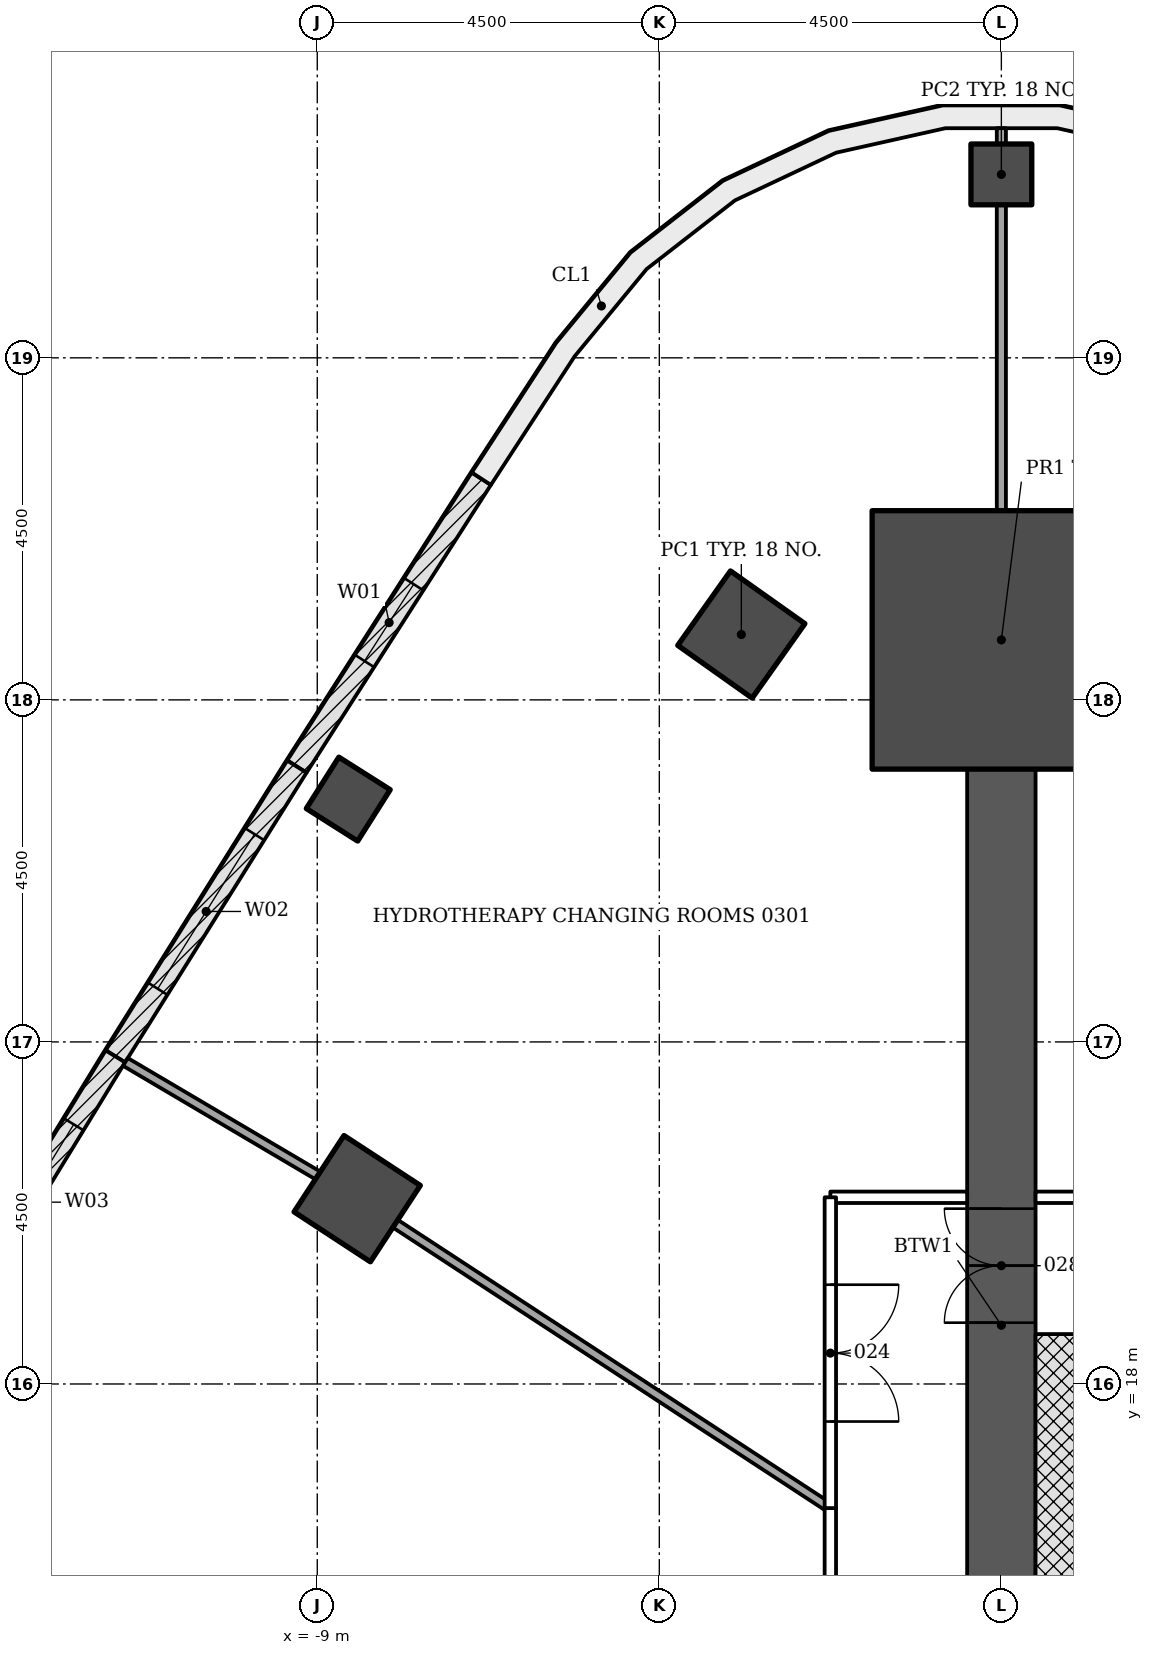
"""IFC4 building model, lengths in metres.
Left out: names, types, materials, properties, quantities, classifications, styles, units other than length and angle.
Written with IfcOpenShell. Run it as: python <this file> out.ifc"""

import sys

from ifc_helpers import new_model, si_unit, direction, frame, frame_2d, origin, origin_2d, place, context, subcontext, project, spatial, polyline, rectangle, outline, extrude, element, fill, save


model = new_model("IFC4")
c1 = context("Model", 3, precision=1e-05, world=origin(), true_north=direction((0.0, 1.0)))
c2 = subcontext(c1, "Body", "Model", "MODEL_VIEW")
j1 = project(units=[si_unit("LENGTHUNIT", "METRE"), si_unit("PLANEANGLEUNIT", "RADIAN")], contexts=[c1])
p1 = place(None, origin())
s1 = spatial("IfcSite", under=j1, at=p1, CompositionType="ELEMENT")
p2 = place(p1, origin())
s2 = spatial("IfcBuilding", under=s1, at=p2, CompositionType="ELEMENT")
p3 = place(p2, frame((0.0, 0.0, 15.0)))
s3 = spatial("IfcBuildingStorey", under=s2, at=p3, CompositionType="ELEMENT", Elevation=15.0)
for number, where, z_axis, x_axis in (
    (1, (-3.421, 27.86, -0.25), (0.0, 0.0, 1.0), (-0.816, 0.578, 0.0)),
    (2, (-8.475, 20.438, -0.25), (0.0, 0.0, 1.0), (-0.837, 0.547, 0.0)),
):
    element("IfcColumn", number, at=place(p3, frame(where, z_axis=z_axis, x_axis=x_axis)), inside=s3, PredefinedType="COLUMN", context=c2, shape_type="SweptSolid", body=[
        extrude(rectangle(XDim=1.2, YDim=1.2, at=origin_2d()), origin(), (0.0, 0.0, 1.0), 4.5),
    ])
for number, where, z_axis, x_axis in (
    (3, (0.0, 33.913, -0.25), (0.0, 0.0, 1.0), (0.0, 1.0, 0.0)),
    (4, (-8.592, 25.695, -0.25), (0.0, 0.0, 1.0), (-0.845, 0.535, 0.0)),
):
    element("IfcColumn", number, at=place(p3, frame(where, z_axis=z_axis, x_axis=x_axis)), inside=s3, PredefinedType="COLUMN", context=c2, shape_type="SweptSolid", body=[
        extrude(rectangle(XDim=0.8, YDim=0.8, at=origin_2d()), origin(), (0.0, 0.0, 1.0), 4.5),
    ])
p4 = place(p3, frame((0.0, 11.456, -0.25), z_axis=(0.0, 0.0, 1.0), x_axis=(0.0, 1.0, 0.0)))
e5 = element("IfcWall", 5, at=p4, inside=s3, PredefinedType="SHEAR", context=c2, shape_type="SweptSolid", body=[
    extrude(rectangle(XDim=14.633, YDim=0.9, at=frame_2d((7.316, 0.0))), origin(), (0.0, 0.0, 1.0), 4.5),
])
p5 = place(p4, frame((7.35, 0.0, 0.25)))
e6 = element("IfcOpeningElement", 6, at=p5, cuts=e5, PredefinedType="OPENING", context=c2, shape_type="SweptSolid", body=[
    extrude(rectangle(XDim=1.5, YDim=2.1, at=frame_2d((0.75, 1.05))), frame((0.0, 0.46, 0.0), z_axis=(0.0, -1.0, 0.0), x_axis=(1.0, 0.0, 0.0)), (0.0, 0.0, 1.0), 0.92),
])
p6 = place(p3, frame((0.0, 27.789, -0.25), z_axis=(0.0, 0.0, 1.0), x_axis=(0.0, 1.0, 0.0)))
e7 = element("IfcColumn", 7, at=p6, inside=s3, PredefinedType="COLUMN", context=c2, shape_type="SweptSolid", body=[
    extrude(rectangle(XDim=3.4, YDim=3.4, at=origin_2d()), origin(), (0.0, 0.0, 1.0), 4.5),
])
p7 = place(p3, frame((-9.268, 26.124, 0.0), z_axis=(0.0, 0.0, 1.0), x_axis=(0.539483537275, 0.841996147859, 0.0)))
e8 = element("IfcWall", 8, at=p7, inside=s3, PredefinedType="NOTDEFINED", context=c2, shape_type="SweptSolid", body=[
    extrude(rectangle(XDim=4.496, YDim=0.3, at=frame_2d((2.248, 0.0))), origin(), (0.0, 0.0, 1.0), 4.25),
])
p8 = place(p7, frame((1.648, 0.0, 0.8)))
e9 = element("IfcOpeningElement", 9, at=p8, cuts=e8, PredefinedType="OPENING", context=c2, shape_type="SweptSolid", body=[
    extrude(rectangle(XDim=1.2, YDim=3.0, at=frame_2d((0.6, 1.5))), frame((0.0, 0.16, 0.0), z_axis=(0.0, -1.0, 0.0), x_axis=(1.0, 0.0, 0.0)), (0.0, 0.0, 1.0), 0.32),
])
p9 = place(p3, frame((-11.655, 22.311, 0.0), z_axis=(0.0, 0.0, 1.0), x_axis=(0.530804082031, 0.847494558389, 0.0)))
e10 = element("IfcWall", 10, at=p9, inside=s3, PredefinedType="NOTDEFINED", context=c2, shape_type="SweptSolid", body=[
    extrude(rectangle(XDim=4.496, YDim=0.3, at=frame_2d((2.248, 0.0))), origin(), (0.0, 0.0, 1.0), 4.25),
])
p10 = place(p9, frame((1.048, 0.0, 0.9)))
e11 = element("IfcOpeningElement", 11, at=p10, cuts=e10, PredefinedType="OPENING", context=c2, shape_type="SweptSolid", body=[
    extrude(rectangle(XDim=2.4, YDim=2.4, at=frame_2d((1.2, 1.2))), frame((0.0, 0.16, 0.0), z_axis=(0.0, -1.0, 0.0), x_axis=(1.0, 0.0, 0.0)), (0.0, 0.0, 1.0), 0.32),
])
p11 = place(p3, frame((-14.004, 18.475, 0.0), z_axis=(0.0, 0.0, 1.0), x_axis=(0.522078085402, 0.852897691838, 0.0)))
e12 = element("IfcWall", 12, at=p11, inside=s3, PredefinedType="NOTDEFINED", context=c2, shape_type="SweptSolid", body=[
    extrude(rectangle(XDim=4.496, YDim=0.3, at=frame_2d((2.248, 0.0))), origin(), (0.0, 0.0, 1.0), 4.25),
])
p12 = place(p11, frame((1.048, 0.0, 0.9)))
e13 = element("IfcOpeningElement", 13, at=p12, cuts=e12, PredefinedType="OPENING", context=c2, shape_type="SweptSolid", body=[
    extrude(rectangle(XDim=2.4, YDim=2.4, at=frame_2d((1.2, 1.2))), frame((0.0, 0.16, 0.0), z_axis=(0.0, -1.0, 0.0), x_axis=(1.0, 0.0, 0.0)), (0.0, 0.0, 1.0), 0.32),
])
p13 = place(p3, origin())
e14 = element("IfcWall", 14, at=p13, inside=s3, PredefinedType="NOTDEFINED", context=c2, shape_type="SweptSolid", body=[
    extrude(outline(polyline([(6.967, 29.992), (5.857, 31.697), (4.878, 32.884), (3.663, 33.828), (2.271, 34.485), (0.769, 34.821), (-0.769, 34.821), (-2.271, 34.485), (-3.663, 33.828), (-4.878, 32.884), (-5.857, 31.697), (-6.967, 29.992), (-6.716, 29.828), (-5.615, 31.519), (-4.667, 32.667), (-3.505, 33.571), (-2.173, 34.199), (-0.736, 34.521), (0.736, 34.521), (2.173, 34.199), (3.505, 33.571), (4.667, 32.667), (5.615, 31.519), (6.716, 29.828), (6.967, 29.992)])), origin(), (0.0, 0.0, 1.0), 4.25),
])
p14 = place(p3, frame((1.018, 11.456, -0.25), z_axis=(0.0, 0.0, 1.0), x_axis=(0.0, 1.0, 0.0)))
e15 = element("IfcWall", 15, at=p14, inside=s3, PredefinedType="SHEAR", context=c2, shape_type="SweptSolid", body=[
    extrude(rectangle(XDim=7.2, YDim=1.136, at=frame_2d((3.6, 0.0))), origin(), (0.0, 0.0, 1.0), 4.5),
])
p15 = place(p3, frame((7.136, 20.456, 0.0), z_axis=(0.0, 0.0, 1.0), x_axis=(-1.0, 0.0, 0.0)))
e16 = element("IfcWall", 16, at=p15, inside=s3, PredefinedType="PARTITIONING", context=c2, shape_type="SweptSolid", body=[
    extrude(rectangle(XDim=6.686, YDim=0.15, at=frame_2d((3.343, 0.0))), origin(), (0.0, 0.0, 1.0), 3.638),
])
p16 = place(p15, frame((2.45, 0.0, 0.0)))
e17 = element("IfcOpeningElement", 17, at=p16, cuts=e16, PredefinedType="OPENING", context=c2, shape_type="SweptSolid", body=[
    extrude(rectangle(XDim=1.8, YDim=2.1, at=frame_2d((0.9, 1.05))), frame((0.0, 0.085, 0.0), z_axis=(0.0, -1.0, 0.0), x_axis=(1.0, 0.0, 0.0)), (0.0, 0.0, 1.0), 0.17),
])
p17 = place(p3, frame((-2.25, 16.367, 0.0), z_axis=(0.0, 0.0, 1.0), x_axis=(0.0, -1.0, 0.0)))
e18 = element("IfcWall", 18, at=p17, inside=s3, PredefinedType="PARTITIONING", context=c2, shape_type="SweptSolid", body=[
    extrude(rectangle(XDim=1.411, YDim=0.15, at=frame_2d((0.706, 0.0))), origin(), (0.0, 0.0, 1.0), 3.638),
])
p18 = place(p3, frame((-0.45, 20.456, 0.0), z_axis=(0.0, 0.0, 1.0), x_axis=(-1.0, 0.0, 0.0)))
e19 = element("IfcWall", 19, at=p18, inside=s3, PredefinedType="PARTITIONING", context=c2, shape_type="SweptSolid", body=[
    extrude(rectangle(XDim=1.8, YDim=0.15, at=frame_2d((0.9, 0.0))), origin(), (0.0, 0.0, 1.0), 3.638),
])
p19 = place(p3, frame((-2.25, 20.456, 0.0), z_axis=(0.0, 0.0, 1.0), x_axis=(0.0, -1.0, 0.0)))
e20 = element("IfcWall", 20, at=p19, inside=s3, PredefinedType="PARTITIONING", context=c2, shape_type="SweptSolid", body=[
    extrude(rectangle(XDim=4.089, YDim=0.15, at=frame_2d((2.044, 0.0))), origin(), (0.0, 0.0, 1.0), 3.638),
])
p20 = place(p19, frame((1.15, 0.0, 0.0)))
e21 = element("IfcOpeningElement", 21, at=p20, cuts=e20, PredefinedType="OPENING", context=c2, shape_type="SweptSolid", body=[
    extrude(rectangle(XDim=1.8, YDim=2.1, at=frame_2d((0.9, 1.05))), frame((0.0, 0.085, 0.0), z_axis=(0.0, -1.0, 0.0), x_axis=(1.0, 0.0, 0.0)), (0.0, 0.0, 1.0), 0.17),
])
p21 = place(p3, frame((-8.992, 20.743, 0.0), z_axis=(0.0, 0.0, 1.0), x_axis=(-0.861228913487, 0.508217235613, 0.0)))
e22 = element("IfcWall", 22, at=p21, inside=s3, PredefinedType="PARTITIONING", context=c2, shape_type="SweptSolid", body=[
    extrude(rectangle(XDim=2.94, YDim=0.12, at=frame_2d((1.47, 0.0))), origin(), (0.0, 0.0, 1.0), 3.633),
])
p22 = place(p3, frame((-2.252, 16.367, 0.0), z_axis=(0.0, 0.0, 1.0), x_axis=(-0.83688089218, 0.547385031129, 0.0)))
e23 = element("IfcWall", 23, at=p22, inside=s3, PredefinedType="PARTITIONING", context=c2, shape_type="SweptSolid", body=[
    extrude(rectangle(XDim=6.836, YDim=0.12, at=frame_2d((3.418, 0.0))), origin(), (0.0, 0.0, 1.0), 3.638),
])
p23 = place(p3, frame((0.0, 29.489, 0.0), z_axis=(0.0, 0.0, 1.0), x_axis=(0.0, 1.0, 0.0)))
e24 = element("IfcWall", 24, at=p23, inside=s3, PredefinedType="PARTITIONING", context=c2, shape_type="SweptSolid", body=[
    extrude(rectangle(XDim=4.024, YDim=0.12, at=frame_2d((2.012, 0.0))), origin(), (0.0, 0.0, 1.0), 3.717),
])
p24 = place(p3, frame((0.0, 34.313, 0.0), z_axis=(0.0, 0.0, 1.0), x_axis=(0.0, 1.0, 0.0)))
e25 = element("IfcWall", 25, at=p24, inside=s3, PredefinedType="PARTITIONING", context=c2, shape_type="SweptSolid", body=[
    extrude(rectangle(XDim=0.208, YDim=0.12, at=frame_2d((0.104, 0.0))), origin(), (0.0, 0.0, 1.0), 4.25),
])
p25 = place(p8, origin())
e26 = element("IfcWindow", 26, at=p25, inside=s3, PartitioningType="SINGLE_PANEL", PredefinedType="WINDOW", context=c2, shape_type="SweptSolid", body=[
    extrude(rectangle(XDim=1.2, YDim=3.0, at=frame_2d((0.6, 1.5))), frame((0.0, 0.03, 0.0), z_axis=(0.0, -1.0, 0.0), x_axis=(1.0, 0.0, 0.0)), (0.0, 0.0, 1.0), 0.06),
])
fill(e9, e26)
p26 = place(p10, origin())
e27 = element("IfcWindow", 27, at=p26, inside=s3, PartitioningType="DOUBLE_PANEL_VERTICAL", PredefinedType="WINDOW", context=c2, shape_type="SweptSolid", body=[
    extrude(rectangle(XDim=2.4, YDim=2.4, at=frame_2d((1.2, 1.2))), frame((0.0, 0.03, 0.0), z_axis=(0.0, -1.0, 0.0), x_axis=(1.0, 0.0, 0.0)), (0.0, 0.0, 1.0), 0.06),
])
fill(e11, e27)
p27 = place(p12, origin())
e28 = element("IfcWindow", 28, at=p27, inside=s3, PartitioningType="DOUBLE_PANEL_VERTICAL", PredefinedType="WINDOW", context=c2, shape_type="SweptSolid", body=[
    extrude(rectangle(XDim=2.4, YDim=2.4, at=frame_2d((1.2, 1.2))), frame((0.0, 0.03, 0.0), z_axis=(0.0, -1.0, 0.0), x_axis=(1.0, 0.0, 0.0)), (0.0, 0.0, 1.0), 0.06),
])
fill(e13, e28)
p28 = place(p20, origin())
e29 = element("IfcDoor", 29, at=p28, inside=s3, OperationType="DOUBLE_DOOR_SINGLE_SWING", PredefinedType="DOOR", context=c2, shape_type="SweptSolid", body=[
    extrude(rectangle(XDim=1.8, YDim=2.1, at=frame_2d((0.9, 1.05))), frame((0.0, 0.025, 0.0), z_axis=(0.0, -1.0, 0.0), x_axis=(1.0, 0.0, 0.0)), (0.0, 0.0, 1.0), 0.05),
])
fill(e21, e29)
p29 = place(p5, origin())
e30 = element("IfcDoor", 30, at=p29, inside=s3, OperationType="DOUBLE_DOOR_SINGLE_SWING", PredefinedType="DOOR", context=c2, shape_type="SweptSolid", body=[
    extrude(rectangle(XDim=1.5, YDim=2.1, at=frame_2d((0.75, 1.05))), frame((0.0, 0.025, 0.0), z_axis=(0.0, -1.0, 0.0), x_axis=(1.0, 0.0, 0.0)), (0.0, 0.0, 1.0), 0.05),
])
fill(e6, e30)
save(model, sys.argv[1])
